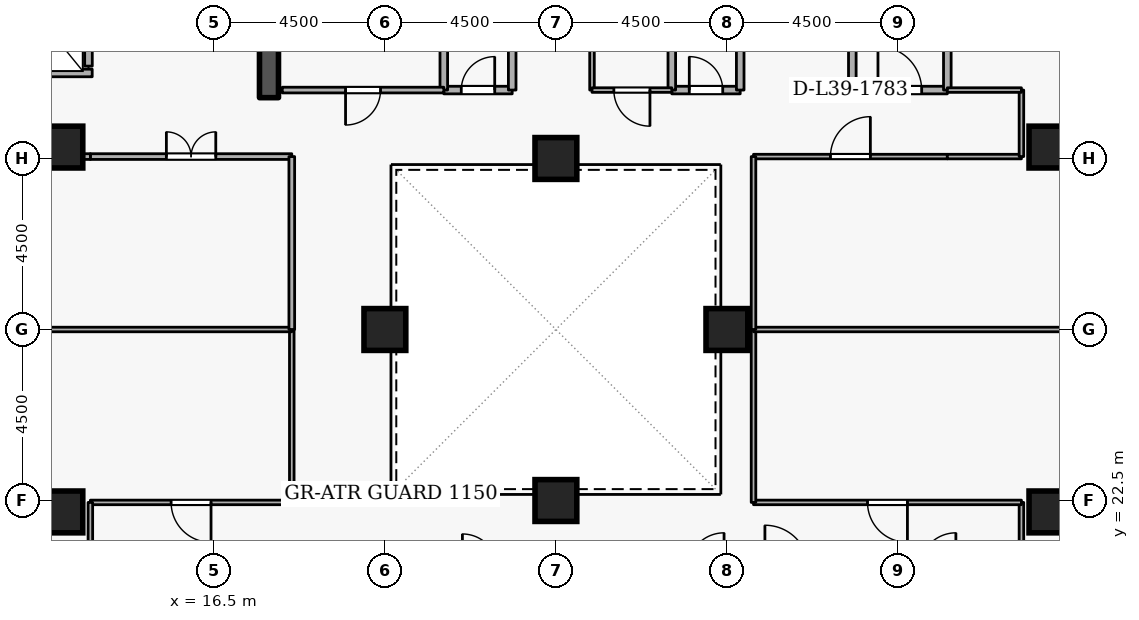
"""IFC4 building model, lengths in metres.
Left out: names, types, materials, properties, quantities, classifications, styles, units other than length and angle.
Written with IfcOpenShell. Run it as: python <this file> out.ifc"""

import sys

from ifc_helpers import new_model, si_unit, direction, frame, frame_2d, origin, origin_2d, place, context, subcontext, project, spatial, rectangle, extrude, element, fill, save


model = new_model("IFC4")
c1 = context("Model", 3, precision=1e-05, world=origin(), true_north=direction((0.0, 1.0)))
c2 = subcontext(c1, "Body", "Model", "MODEL_VIEW")
j1 = project(units=[si_unit("LENGTHUNIT", "METRE"), si_unit("PLANEANGLEUNIT", "RADIAN")], contexts=[c1])
p1 = place(None, origin())
s1 = spatial("IfcSite", under=j1, at=p1, CompositionType="ELEMENT")
p2 = place(p1, origin())
s2 = spatial("IfcBuilding", under=s1, at=p2, CompositionType="ELEMENT")
p3 = place(p2, frame((0.0, 0.0, 149.1)))
s3 = spatial("IfcBuildingStorey", under=s2, at=p3, CompositionType="ELEMENT", Elevation=149.1)
p4 = place(p3, frame((17.95, 33.1, 0.0), z_axis=(0.0, 0.0, 1.0), x_axis=(0.0, 1.0, 0.0)))
e1 = element("IfcWall", 1, at=p4, inside=s3, PredefinedType="SHEAR", context=c2, shape_type="SweptSolid", body=[
    extrude(rectangle(XDim=5.8, YDim=0.5, at=frame_2d((2.9, 0.0))), origin(), (0.0, 0.0, 1.0), 3.6),
])
for number, where, z_axis, x_axis in (
    (2, (12.5, 22.2, 0.0), (0.0, 0.0, 1.0), (1.0, 0.0, 0.0)),
    (3, (38.5, 22.2, 0.0), (0.0, 0.0, 1.0), (1.0, 0.0, 0.0)),
    (4, (12.5, 31.8, 0.0), (0.0, 0.0, 1.0), (1.0, 0.0, 0.0)),
    (5, (38.5, 31.8, 0.0), (0.0, 0.0, 1.0), (1.0, 0.0, 0.0)),
    (6, (25.5, 22.5, 0.0), (0.0, 0.0, 1.0), (1.0, 0.0, 0.0)),
    (7, (25.5, 31.5, 0.0), (0.0, 0.0, 1.0), (1.0, 0.0, 0.0)),
    (8, (21.0, 27.0, 0.0), (0.0, 0.0, 1.0), (1.0, 0.0, 0.0)),
    (9, (30.0, 27.0, 0.0), (0.0, 0.0, 1.0), (1.0, 0.0, 0.0)),
):
    element("IfcColumn", number, at=place(p3, frame(where, z_axis=z_axis, x_axis=x_axis)), inside=s3, PredefinedType="COLUMN", context=c2, shape_type="SweptSolid", body=[
        extrude(rectangle(XDim=1.1, YDim=1.1, at=origin_2d()), origin(), (0.0, 0.0, 1.0), 3.6),
    ])
p5 = place(p3, frame((13.2, 33.93, 0.0), z_axis=(0.0, 0.0, 1.0), x_axis=(0.0, 1.0, 0.0)))
e10 = element("IfcWall", 10, at=p5, inside=s3, PredefinedType="STANDARD", context=c2, shape_type="SweptSolid", body=[
    extrude(rectangle(XDim=1.94, YDim=0.2, at=frame_2d((0.97, 0.0))), origin(), (0.0, 0.0, 1.0), 3.3),
])
p6 = place(p5, frame((0.46, 0.0, 0.0)))
e11 = element("IfcOpeningElement", 11, at=p6, cuts=e10, PredefinedType="OPENING", context=c2, shape_type="SweptSolid", body=[
    extrude(rectangle(XDim=1.02, YDim=2.06, at=frame_2d((0.51, 1.03))), frame((0.0, 0.11, 0.0), z_axis=(0.0, -1.0, 0.0), x_axis=(1.0, 0.0, 0.0)), (0.0, 0.0, 1.0), 0.22),
])
p7 = place(p3, frame((11.002, 33.75, 0.0), z_axis=(0.0, 0.0, 1.0), x_axis=(1.0, 0.0, 0.0)))
e12 = element("IfcWall", 12, at=p7, inside=s3, PredefinedType="STANDARD", context=c2, shape_type="SweptSolid", body=[
    extrude(rectangle(XDim=2.296, YDim=0.2, at=frame_2d((1.148, 0.0))), origin(), (0.0, 0.0, 1.0), 3.3),
])
p8 = place(p3, frame((33.3, 33.3, 0.0), z_axis=(0.0, 0.0, 1.0), x_axis=(1.0, 0.0, 0.0)))
e13 = element("IfcWall", 13, at=p8, inside=s3, PredefinedType="STANDARD", context=c2, shape_type="SweptSolid", body=[
    extrude(rectangle(XDim=2.5, YDim=0.2, at=frame_2d((1.25, 0.0))), origin(), (0.0, 0.0, 1.0), 3.3),
])
p9 = place(p8, frame((0.675, 0.0, 0.0)))
e14 = element("IfcOpeningElement", 14, at=p9, cuts=e13, PredefinedType="OPENING", context=c2, shape_type="SweptSolid", body=[
    extrude(rectangle(XDim=1.15, YDim=2.1, at=frame_2d((0.575, 1.05))), frame((0.0, 0.11, 0.0), z_axis=(0.0, -1.0, 0.0), x_axis=(1.0, 0.0, 0.0)), (0.0, 0.0, 1.0), 0.22),
])
p10 = place(p3, frame((35.8, 33.3, 0.0), z_axis=(0.0, 0.0, 1.0), x_axis=(0.0, 1.0, 0.0)))
e15 = element("IfcWall", 15, at=p10, inside=s3, PredefinedType="STANDARD", context=c2, shape_type="SweptSolid", body=[
    extrude(rectangle(XDim=5.7, YDim=0.2, at=frame_2d((2.85, 0.0))), origin(), (0.0, 0.0, 1.0), 3.3),
])
p11 = place(p3, frame((33.3, 35.6, 0.0), z_axis=(0.0, 0.0, 1.0), x_axis=(0.0, -1.0, 0.0)))
e16 = element("IfcWall", 16, at=p11, inside=s3, PredefinedType="STANDARD", context=c2, shape_type="SweptSolid", body=[
    extrude(rectangle(XDim=2.3, YDim=0.2, at=frame_2d((1.15, 0.0))), origin(), (0.0, 0.0, 1.0), 2.505),
])
p12 = place(p3, frame((22.55, 33.3, 0.0), z_axis=(0.0, 0.0, 1.0), x_axis=(1.0, 0.0, 0.0)))
e17 = element("IfcWall", 17, at=p12, inside=s3, PredefinedType="STANDARD", context=c2, shape_type="SweptSolid", body=[
    extrude(rectangle(XDim=1.8, YDim=0.2, at=frame_2d((0.9, 0.0))), origin(), (0.0, 0.0, 1.0), 3.3),
])
p13 = place(p12, frame((0.46, 0.0, 0.0)))
e18 = element("IfcOpeningElement", 18, at=p13, cuts=e17, PredefinedType="OPENING", context=c2, shape_type="SweptSolid", body=[
    extrude(rectangle(XDim=0.88, YDim=2.04, at=frame_2d((0.44, 1.02))), frame((0.0, 0.11, 0.0), z_axis=(0.0, -1.0, 0.0), x_axis=(1.0, 0.0, 0.0)), (0.0, 0.0, 1.0), 0.22),
])
for number, where, z_axis, x_axis in (
    (19, (24.35, 33.3, 0.0), (0.0, 0.0, 1.0), (0.0, 1.0, 0.0)),
    (20, (22.55, 35.35, 0.0), (0.0, 0.0, 1.0), (0.0, -1.0, 0.0)),
):
    element("IfcWall", number, at=place(p3, frame(where, z_axis=z_axis, x_axis=x_axis)), inside=s3, PredefinedType="STANDARD", context=c2, shape_type="SweptSolid", body=[
        extrude(rectangle(XDim=2.05, YDim=0.2, at=frame_2d((1.025, 0.0))), origin(), (0.0, 0.0, 1.0), 3.3),
    ])
p14 = place(p3, frame((28.55, 33.3, 0.0), z_axis=(0.0, 0.0, 1.0), x_axis=(1.0, 0.0, 0.0)))
e21 = element("IfcWall", 21, at=p14, inside=s3, PredefinedType="STANDARD", context=c2, shape_type="SweptSolid", body=[
    extrude(rectangle(XDim=1.8, YDim=0.2, at=frame_2d((0.9, 0.0))), origin(), (0.0, 0.0, 1.0), 3.3),
])
p15 = place(p14, frame((0.46, 0.0, 0.0)))
e22 = element("IfcOpeningElement", 22, at=p15, cuts=e21, PredefinedType="OPENING", context=c2, shape_type="SweptSolid", body=[
    extrude(rectangle(XDim=0.88, YDim=2.04, at=frame_2d((0.44, 1.02))), frame((0.0, 0.11, 0.0), z_axis=(0.0, -1.0, 0.0), x_axis=(1.0, 0.0, 0.0)), (0.0, 0.0, 1.0), 0.22),
])
for number, where, z_axis, x_axis in (
    (23, (30.35, 33.3, 0.0), (0.0, 0.0, 1.0), (0.0, 1.0, 0.0)),
    (24, (28.55, 35.35, 0.0), (0.0, 0.0, 1.0), (0.0, -1.0, 0.0)),
):
    element("IfcWall", number, at=place(p3, frame(where, z_axis=z_axis, x_axis=x_axis)), inside=s3, PredefinedType="STANDARD", context=c2, shape_type="SweptSolid", body=[
        extrude(rectangle(XDim=2.05, YDim=0.2, at=frame_2d((1.025, 0.0))), origin(), (0.0, 0.0, 1.0), 3.3),
    ])
p16 = place(p3, frame((22.55, 33.3, 0.0), z_axis=(0.0, 0.0, 1.0), x_axis=(-1.0, 0.0, 0.0)))
e25 = element("IfcWall", 25, at=p16, inside=s3, PredefinedType="PARTITIONING", context=c2, shape_type="SweptSolid", body=[
    extrude(rectangle(XDim=4.25, YDim=0.15, at=frame_2d((2.125, 0.0))), origin(), (0.0, 0.0, 1.0), 3.3),
])
p17 = place(p16, frame((1.665, 0.0, 0.0)))
e26 = element("IfcOpeningElement", 26, at=p17, cuts=e25, PredefinedType="OPENING", context=c2, shape_type="SweptSolid", body=[
    extrude(rectangle(XDim=0.92, YDim=2.08, at=frame_2d((0.46, 1.04))), frame((0.0, 0.085, 0.0), z_axis=(0.0, -1.0, 0.0), x_axis=(1.0, 0.0, 0.0)), (0.0, 0.0, 1.0), 0.17),
])
p18 = place(p3, frame((26.45, 33.3, 0.0), z_axis=(0.0, 0.0, 1.0), x_axis=(0.0, 1.0, 0.0)))
e27 = element("IfcWall", 27, at=p18, inside=s3, PredefinedType="PARTITIONING", context=c2, shape_type="SweptSolid", body=[
    extrude(rectangle(XDim=2.05, YDim=0.12, at=frame_2d((1.025, 0.0))), origin(), (0.0, 0.0, 1.0), 3.3),
])
p19 = place(p3, frame((28.55, 33.3, 0.0), z_axis=(0.0, 0.0, 1.0), x_axis=(-1.0, 0.0, 0.0)))
e28 = element("IfcWall", 28, at=p19, inside=s3, PredefinedType="PARTITIONING", context=c2, shape_type="SweptSolid", body=[
    extrude(rectangle(XDim=2.1, YDim=0.12, at=frame_2d((1.05, 0.0))), origin(), (0.0, 0.0, 1.0), 3.3),
])
p20 = place(p19, frame((0.575, 0.0, 0.0)))
e29 = element("IfcOpeningElement", 29, at=p20, cuts=e28, PredefinedType="OPENING", context=c2, shape_type="SweptSolid", body=[
    extrude(rectangle(XDim=0.95, YDim=2.1, at=frame_2d((0.475, 1.05))), frame((0.0, 0.07, 0.0), z_axis=(0.0, -1.0, 0.0), x_axis=(1.0, 0.0, 0.0)), (0.0, 0.0, 1.0), 0.14),
])
p21 = place(p3, frame((18.55, 27.0, 0.0), z_axis=(0.0, 0.0, 1.0), x_axis=(0.0, -1.0, 0.0)))
e30 = element("IfcWall", 30, at=p21, inside=s3, PredefinedType="PARTITIONING", context=c2, shape_type="SweptSolid", body=[
    extrude(rectangle(XDim=4.55, YDim=0.12, at=frame_2d((2.275, 0.0))), origin(), (0.0, 0.0, 1.0), 3.3),
])
p22 = place(p3, frame((18.55, 22.45, 0.0), z_axis=(0.0, 0.0, 1.0), x_axis=(-1.0, 0.0, 0.0)))
e31 = element("IfcWall", 31, at=p22, inside=s3, PredefinedType="PARTITIONING", context=c2, shape_type="SweptSolid", body=[
    extrude(rectangle(XDim=5.3, YDim=0.12, at=frame_2d((2.65, 0.0))), origin(), (0.0, 0.0, 1.0), 3.3),
])
p23 = place(p22, frame((2.125, 0.0, 0.0)))
e32 = element("IfcOpeningElement", 32, at=p23, cuts=e31, PredefinedType="OPENING", context=c2, shape_type="SweptSolid", body=[
    extrude(rectangle(XDim=1.05, YDim=2.1, at=frame_2d((0.525, 1.05))), frame((0.0, 0.07, 0.0), z_axis=(0.0, -1.0, 0.0), x_axis=(1.0, 0.0, 0.0)), (0.0, 0.0, 1.0), 0.14),
])
p24 = place(p3, frame((13.25, 22.45, 0.0), z_axis=(0.0, 0.0, 1.0), x_axis=(0.0, -1.0, 0.0)))
e33 = element("IfcWall", 33, at=p24, inside=s3, PredefinedType="PARTITIONING", context=c2, shape_type="SweptSolid", body=[
    extrude(rectangle(XDim=1.75, YDim=0.12, at=frame_2d((0.875, 0.0))), origin(), (0.0, 0.0, 1.0), 3.3),
])
p25 = place(p3, frame((7.78, 27.0, 0.0), z_axis=(0.0, 0.0, 1.0), x_axis=(1.0, 0.0, 0.0)))
e34 = element("IfcWall", 34, at=p25, inside=s3, PredefinedType="PARTITIONING", context=c2, shape_type="SweptSolid", body=[
    extrude(rectangle(XDim=10.77, YDim=0.12, at=frame_2d((5.385, 0.0))), origin(), (0.0, 0.0, 1.0), 2.892),
])
p26 = place(p3, frame((13.25, 31.55, 0.0), z_axis=(0.0, 0.0, 1.0), x_axis=(1.0, 0.0, 0.0)))
e35 = element("IfcWall", 35, at=p26, inside=s3, PredefinedType="PARTITIONING", context=c2, shape_type="SweptSolid", body=[
    extrude(rectangle(XDim=5.3, YDim=0.15, at=frame_2d((2.65, 0.0))), origin(), (0.0, 0.0, 1.0), 3.3),
])
p27 = place(p26, frame((2.0, 0.0, 0.0)))
e36 = element("IfcOpeningElement", 36, at=p27, cuts=e35, PredefinedType="OPENING", context=c2, shape_type="SweptSolid", body=[
    extrude(rectangle(XDim=1.3, YDim=2.12, at=frame_2d((0.65, 1.06))), frame((0.0, 0.085, 0.0), z_axis=(0.0, -1.0, 0.0), x_axis=(1.0, 0.0, 0.0)), (0.0, 0.0, 1.0), 0.17),
])
p28 = place(p3, frame((18.55, 31.55, 0.0), z_axis=(0.0, 0.0, 1.0), x_axis=(0.0, -1.0, 0.0)))
e37 = element("IfcWall", 37, at=p28, inside=s3, PredefinedType="PARTITIONING", context=c2, shape_type="SweptSolid", body=[
    extrude(rectangle(XDim=4.55, YDim=0.15, at=frame_2d((2.275, 0.0))), origin(), (0.0, 0.0, 1.0), 3.3),
])
p29 = place(p3, frame((10.9, 31.55, 0.0), z_axis=(0.0, 0.0, 1.0), x_axis=(1.0, 0.0, 0.0)))
e38 = element("IfcWall", 38, at=p29, inside=s3, PredefinedType="PARTITIONING", context=c2, shape_type="SweptSolid", body=[
    extrude(rectangle(XDim=2.35, YDim=0.15, at=frame_2d((1.175, 0.0))), origin(), (0.0, 0.0, 1.0), 3.3),
])
p30 = place(p3, frame((37.75, 20.7, 0.0), z_axis=(0.0, 0.0, 1.0), x_axis=(0.0, 1.0, 0.0)))
e39 = element("IfcWall", 39, at=p30, inside=s3, PredefinedType="PARTITIONING", context=c2, shape_type="SweptSolid", body=[
    extrude(rectangle(XDim=1.75, YDim=0.12, at=frame_2d((0.875, 0.0))), origin(), (0.0, 0.0, 1.0), 3.3),
])
p31 = place(p3, frame((37.75, 22.45, 0.0), z_axis=(0.0, 0.0, 1.0), x_axis=(-1.0, 0.0, 0.0)))
e40 = element("IfcWall", 40, at=p31, inside=s3, PredefinedType="PARTITIONING", context=c2, shape_type="SweptSolid", body=[
    extrude(rectangle(XDim=7.05, YDim=0.12, at=frame_2d((3.525, 0.0))), origin(), (0.0, 0.0, 1.0), 3.3),
])
p32 = place(p31, frame((3.0, 0.0, 0.0)))
e41 = element("IfcOpeningElement", 41, at=p32, cuts=e40, PredefinedType="OPENING", context=c2, shape_type="SweptSolid", body=[
    extrude(rectangle(XDim=1.05, YDim=2.1, at=frame_2d((0.525, 1.05))), frame((0.0, 0.07, 0.0), z_axis=(0.0, -1.0, 0.0), x_axis=(1.0, 0.0, 0.0)), (0.0, 0.0, 1.0), 0.14),
])
p33 = place(p3, frame((30.7, 22.45, 0.0), z_axis=(0.0, 0.0, 1.0), x_axis=(0.0, 1.0, 0.0)))
e42 = element("IfcWall", 42, at=p33, inside=s3, PredefinedType="PARTITIONING", context=c2, shape_type="SweptSolid", body=[
    extrude(rectangle(XDim=4.55, YDim=0.12, at=frame_2d((2.275, 0.0))), origin(), (0.0, 0.0, 1.0), 3.3),
])
p34 = place(p3, frame((30.7, 27.0, 0.0), z_axis=(0.0, 0.0, 1.0), x_axis=(1.0, 0.0, 0.0)))
e43 = element("IfcWall", 43, at=p34, inside=s3, PredefinedType="PARTITIONING", context=c2, shape_type="SweptSolid", body=[
    extrude(rectangle(XDim=18.52, YDim=0.12, at=frame_2d((9.26, 0.0))), origin(), (0.0, 0.0, 1.0), 2.892),
])
p35 = place(p3, frame((30.7, 31.55, 0.0), z_axis=(0.0, 0.0, 1.0), x_axis=(1.0, 0.0, 0.0)))
e44 = element("IfcWall", 44, at=p35, inside=s3, PredefinedType="PARTITIONING", context=c2, shape_type="SweptSolid", body=[
    extrude(rectangle(XDim=5.1, YDim=0.12, at=frame_2d((2.55, 0.0))), origin(), (0.0, 0.0, 1.0), 3.3),
])
p36 = place(p35, frame((2.025, 0.0, 0.0)))
e45 = element("IfcOpeningElement", 45, at=p36, cuts=e44, PredefinedType="OPENING", context=c2, shape_type="SweptSolid", body=[
    extrude(rectangle(XDim=1.05, YDim=2.1, at=frame_2d((0.525, 1.05))), frame((0.0, 0.07, 0.0), z_axis=(0.0, -1.0, 0.0), x_axis=(1.0, 0.0, 0.0)), (0.0, 0.0, 1.0), 0.14),
])
p37 = place(p3, frame((35.8, 31.55, 0.0), z_axis=(0.0, 0.0, 1.0), x_axis=(1.0, 0.0, 0.0)))
e46 = element("IfcWall", 46, at=p37, inside=s3, PredefinedType="PARTITIONING", context=c2, shape_type="SweptSolid", body=[
    extrude(rectangle(XDim=1.95, YDim=0.12, at=frame_2d((0.975, 0.0))), origin(), (0.0, 0.0, 1.0), 3.3),
])
p38 = place(p3, frame((37.75, 31.55, 0.0), z_axis=(0.0, 0.0, 1.0), x_axis=(0.0, 1.0, 0.0)))
e47 = element("IfcWall", 47, at=p38, inside=s3, PredefinedType="PARTITIONING", context=c2, shape_type="SweptSolid", body=[
    extrude(rectangle(XDim=1.75, YDim=0.12, at=frame_2d((0.875, 0.0))), origin(), (0.0, 0.0, 1.0), 3.3),
])
p39 = place(p3, frame((37.75, 33.3, 0.0), z_axis=(0.0, 0.0, 1.0), x_axis=(-1.0, 0.0, 0.0)))
e48 = element("IfcWall", 48, at=p39, inside=s3, PredefinedType="PARTITIONING", context=c2, shape_type="SweptSolid", body=[
    extrude(rectangle(XDim=1.95, YDim=0.12, at=frame_2d((0.975, 0.0))), origin(), (0.0, 0.0, 1.0), 3.3),
])
p40 = place(p3, frame((30.7, 27.0, 0.0), z_axis=(0.0, 0.0, 1.0), x_axis=(0.0, 1.0, 0.0)))
e49 = element("IfcWall", 49, at=p40, inside=s3, PredefinedType="PARTITIONING", context=c2, shape_type="SweptSolid", body=[
    extrude(rectangle(XDim=4.55, YDim=0.12, at=frame_2d((2.275, 0.0))), origin(), (0.0, 0.0, 1.0), 3.3),
])
p41 = place(p9, origin())
e50 = element("IfcDoor", 50, at=p41, inside=s3, OperationType="SINGLE_SWING_LEFT", PredefinedType="DOOR", context=c2, shape_type="SweptSolid", body=[
    extrude(rectangle(XDim=1.15, YDim=2.1, at=frame_2d((0.575, 1.05))), frame((0.0, 0.025, 0.0), z_axis=(0.0, -1.0, 0.0), x_axis=(1.0, 0.0, 0.0)), (0.0, 0.0, 1.0), 0.05),
])
fill(e14, e50)
p42 = place(p13, origin())
e51 = element("IfcDoor", 51, at=p42, inside=s3, OperationType="SINGLE_SWING_RIGHT", PredefinedType="DOOR", context=c2, shape_type="SweptSolid", body=[
    extrude(rectangle(XDim=0.88, YDim=2.04, at=frame_2d((0.44, 1.02))), frame((0.0, 0.025, 0.0), z_axis=(0.0, -1.0, 0.0), x_axis=(1.0, 0.0, 0.0)), (0.0, 0.0, 1.0), 0.05),
])
fill(e18, e51)
p43 = place(p15, origin())
e52 = element("IfcDoor", 52, at=p43, inside=s3, OperationType="SINGLE_SWING_LEFT", PredefinedType="DOOR", context=c2, shape_type="SweptSolid", body=[
    extrude(rectangle(XDim=0.88, YDim=2.04, at=frame_2d((0.44, 1.02))), frame((0.0, 0.025, 0.0), z_axis=(0.0, -1.0, 0.0), x_axis=(1.0, 0.0, 0.0)), (0.0, 0.0, 1.0), 0.05),
])
fill(e22, e52)
p44 = place(p17, origin())
e53 = element("IfcDoor", 53, at=p44, inside=s3, OperationType="SINGLE_SWING_RIGHT", PredefinedType="DOOR", context=c2, shape_type="SweptSolid", body=[
    extrude(rectangle(XDim=0.92, YDim=2.08, at=frame_2d((0.46, 1.04))), frame((0.0, 0.025, 0.0), z_axis=(0.0, -1.0, 0.0), x_axis=(1.0, 0.0, 0.0)), (0.0, 0.0, 1.0), 0.05),
])
fill(e26, e53)
p45 = place(p20, origin())
e54 = element("IfcDoor", 54, at=p45, inside=s3, OperationType="SINGLE_SWING_LEFT", PredefinedType="DOOR", context=c2, shape_type="SweptSolid", body=[
    extrude(rectangle(XDim=0.95, YDim=2.1, at=frame_2d((0.475, 1.05))), frame((0.0, 0.025, 0.0), z_axis=(0.0, -1.0, 0.0), x_axis=(1.0, 0.0, 0.0)), (0.0, 0.0, 1.0), 0.05),
])
fill(e29, e54)
p46 = place(p23, origin())
e55 = element("IfcDoor", 55, at=p46, inside=s3, OperationType="SINGLE_SWING_LEFT", PredefinedType="DOOR", context=c2, shape_type="SweptSolid", body=[
    extrude(rectangle(XDim=1.05, YDim=2.1, at=frame_2d((0.525, 1.05))), frame((0.0, 0.025, 0.0), z_axis=(0.0, -1.0, 0.0), x_axis=(1.0, 0.0, 0.0)), (0.0, 0.0, 1.0), 0.05),
])
fill(e32, e55)
p47 = place(p27, origin())
e56 = element("IfcDoor", 56, at=p47, inside=s3, OperationType="DOUBLE_DOOR_SINGLE_SWING", PredefinedType="DOOR", context=c2, shape_type="SweptSolid", body=[
    extrude(rectangle(XDim=1.3, YDim=2.12, at=frame_2d((0.65, 1.06))), frame((0.0, 0.025, 0.0), z_axis=(0.0, -1.0, 0.0), x_axis=(1.0, 0.0, 0.0)), (0.0, 0.0, 1.0), 0.05),
])
fill(e36, e56)
p48 = place(p32, origin())
e57 = element("IfcDoor", 57, at=p48, inside=s3, OperationType="SINGLE_SWING_LEFT", PredefinedType="DOOR", context=c2, shape_type="SweptSolid", body=[
    extrude(rectangle(XDim=1.05, YDim=2.1, at=frame_2d((0.525, 1.05))), frame((0.0, 0.025, 0.0), z_axis=(0.0, -1.0, 0.0), x_axis=(1.0, 0.0, 0.0)), (0.0, 0.0, 1.0), 0.05),
])
fill(e41, e57)
p49 = place(p36, origin())
e58 = element("IfcDoor", 58, at=p49, inside=s3, OperationType="SINGLE_SWING_RIGHT", PredefinedType="DOOR", context=c2, shape_type="SweptSolid", body=[
    extrude(rectangle(XDim=1.05, YDim=2.1, at=frame_2d((0.525, 1.05))), frame((0.0, 0.025, 0.0), z_axis=(0.0, -1.0, 0.0), x_axis=(1.0, 0.0, 0.0)), (0.0, 0.0, 1.0), 0.05),
])
fill(e45, e58)
save(model, sys.argv[1])
